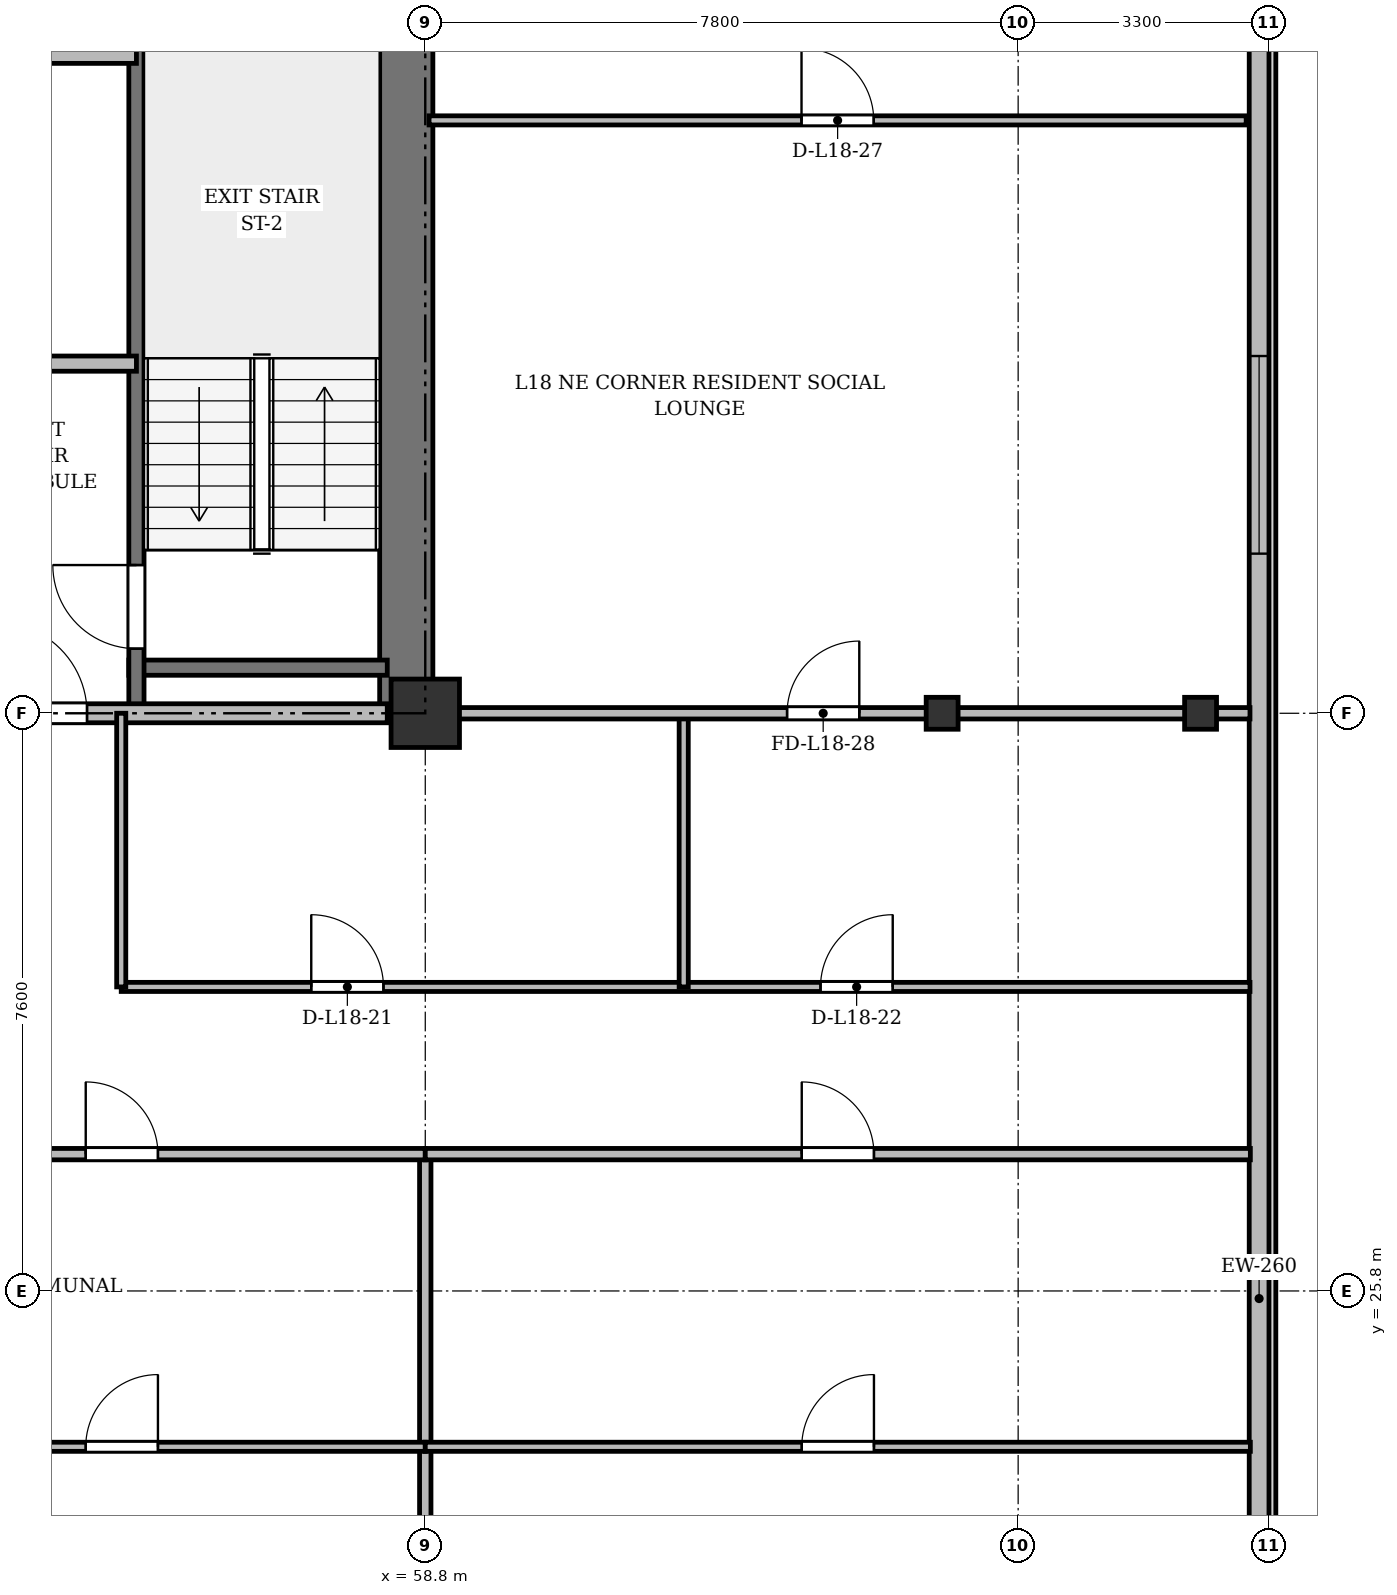
"""IFC4 building model, lengths in metres.
Left out: names, types, materials, properties, quantities, classifications, styles, units other than length and angle.
Written with IfcOpenShell. Run it as: python <this file> out.ifc"""

import sys

from ifc_helpers import new_model, si_unit, direction, frame, frame_2d, origin, origin_2d, place, context, subcontext, project, spatial, rectangle, i_section, extrude, source, transform, mapped, element, fill, save


model = new_model("IFC4")
c1 = context("Model", 3, precision=1e-05, world=origin(), true_north=direction((0.0, 1.0)))
c2 = subcontext(c1, "Body", "Model", "MODEL_VIEW")
j1 = project(units=[si_unit("LENGTHUNIT", "METRE"), si_unit("PLANEANGLEUNIT", "RADIAN")], contexts=[c1])
p1 = place(None, origin())
s1 = spatial("IfcSite", under=j1, at=p1, CompositionType="ELEMENT")
p2 = place(p1, origin())
s2 = spatial("IfcBuilding", under=s1, at=p2, CompositionType="ELEMENT")
p3 = place(p2, frame((0.0, 0.0, 70.3)))
s3 = spatial("IfcBuildingStorey", under=s2, at=p3, CompositionType="ELEMENT", Elevation=70.3)
m1 = source(origin(), c2, "Body", "SweptSolid", [
    extrude(rectangle(XDim=0.9, YDim=0.9, at=origin_2d()), origin(), (0.0, 0.0, 1.0), 3.6),
])
p4 = place(p3, frame((58.8, 33.4, 0.0), z_axis=(0.0, 0.0, 1.0), x_axis=(1.0, 0.0, 0.0)))
e1 = element("IfcColumn", 1, at=p4, inside=s3, PredefinedType="COLUMN", context=c2, shape_type="MappedRepresentation", body=[
    mapped(m1, transform((0.0, 0.0, 0.0), x_axis=(1.0, 0.0, 0.0), y_axis=(0.0, 1.0, 0.0), z_axis=(0.0, 0.0, 1.0), scale=1.0)),
])
m2 = source(origin(), c2, "Body", "SweptSolid", [
    extrude(i_section(OverallWidth=0.42, OverallDepth=0.42, WebThickness=0.026, FlangeThickness=0.04, at=origin_2d()), origin(), (0.0, 0.0, 1.0), 3.6),
])
for number, where, z_axis, x_axis in (
    (2, (65.6, 33.4, 0.0), (0.0, 0.0, 1.0), (1.0, 0.0, 0.0)),
    (3, (69.0, 33.4, 0.0), (0.0, 0.0, 1.0), (1.0, 0.0, 0.0)),
):
    element("IfcColumn", number, at=place(p3, frame(where, z_axis=z_axis, x_axis=x_axis)), inside=s3, PredefinedType="COLUMN", context=c2, shape_type="MappedRepresentation", body=[
        mapped(m2, transform((0.0, 0.0, 0.0), x_axis=(1.0, 0.0, 0.0), y_axis=(0.0, 1.0, 0.0), z_axis=(0.0, 0.0, 1.0), scale=1.0)),
    ])
p5 = place(p3, frame((69.77, 45.5, 0.0), z_axis=(0.0, 0.0, 1.0), x_axis=(0.0, -1.0, 0.0)))
e4 = element("IfcWall", 4, at=p5, inside=s3, PredefinedType="SOLIDWALL", context=c2, shape_type="SweptSolid", body=[
    extrude(rectangle(XDim=39.6, YDim=0.26, at=frame_2d((19.8, 0.0))), origin(), (0.0, 0.0, 1.0), 3.22),
])
p6 = place(p5, frame((36.95, 0.0, 0.92)))
e5 = element("IfcOpeningElement", 5, at=p6, cuts=e4, PredefinedType="OPENING", context=c2, shape_type="SweptSolid", body=[
    extrude(rectangle(XDim=1.2, YDim=1.65, at=frame_2d((0.6, 0.825))), frame((0.0, 0.14, 0.0), z_axis=(0.0, -1.0, 0.0), x_axis=(1.0, 0.0, 0.0)), (0.0, 0.0, 1.0), 0.28),
])
p7 = place(p5, frame((32.8, 0.0, 0.92)))
e6 = element("IfcOpeningElement", 6, at=p7, cuts=e4, PredefinedType="OPENING", context=c2, shape_type="SweptSolid", body=[
    extrude(rectangle(XDim=2.6, YDim=1.9, at=frame_2d((1.3, 0.95))), frame((0.0, 0.14, 0.0), z_axis=(0.0, -1.0, 0.0), x_axis=(1.0, 0.0, 0.0)), (0.0, 0.0, 1.0), 0.28),
])
p8 = place(p5, frame((28.6, 0.0, 0.92)))
e7 = element("IfcOpeningElement", 7, at=p8, cuts=e4, PredefinedType="OPENING", context=c2, shape_type="SweptSolid", body=[
    extrude(rectangle(XDim=2.6, YDim=1.9, at=frame_2d((1.3, 0.95))), frame((0.0, 0.14, 0.0), z_axis=(0.0, -1.0, 0.0), x_axis=(1.0, 0.0, 0.0)), (0.0, 0.0, 1.0), 0.28),
])
p9 = place(p5, frame((7.4, 0.0, 0.92)))
e8 = element("IfcOpeningElement", 8, at=p9, cuts=e4, PredefinedType="OPENING", context=c2, shape_type="SweptSolid", body=[
    extrude(rectangle(XDim=2.6, YDim=1.9, at=frame_2d((1.3, 0.95))), frame((0.0, 0.14, 0.0), z_axis=(0.0, -1.0, 0.0), x_axis=(1.0, 0.0, 0.0)), (0.0, 0.0, 1.0), 0.28),
])
p10 = place(p5, frame((1.15, 0.0, 0.92)))
e9 = element("IfcOpeningElement", 9, at=p10, cuts=e4, PredefinedType="OPENING", context=c2, shape_type="SweptSolid", body=[
    extrude(rectangle(XDim=1.2, YDim=1.65, at=frame_2d((0.6, 0.825))), frame((0.0, 0.14, 0.0), z_axis=(0.0, -1.0, 0.0), x_axis=(1.0, 0.0, 0.0)), (0.0, 0.0, 1.0), 0.28),
])
p11 = place(p3, frame((58.55, 33.4, 0.0), z_axis=(0.0, 0.0, 1.0), x_axis=(0.0, 1.0, 0.0)))
e10 = element("IfcWall", 10, at=p11, inside=s3, PredefinedType="SHEAR", context=c2, shape_type="SweptSolid", body=[
    extrude(rectangle(XDim=11.7, YDim=0.7, at=frame_2d((5.85, 0.0))), origin(), (0.0, 0.0, 1.0), 3.22),
])
p12 = place(p3, frame((54.9, 34.0, 0.0), z_axis=(0.0, 0.0, 1.0), x_axis=(1.0, 0.0, 0.0)))
e11 = element("IfcWall", 11, at=p12, inside=s3, PredefinedType="SHEAR", context=c2, shape_type="SweptSolid", body=[
    extrude(rectangle(XDim=3.4, YDim=0.2, at=frame_2d((1.7, 0.0))), origin(), (0.0, 0.0, 1.0), 3.22),
])
p13 = place(p3, frame((55.0, 33.4, 0.0), z_axis=(0.0, 0.0, 1.0), x_axis=(0.0, 1.0, 0.0)))
e12 = element("IfcWall", 12, at=p13, inside=s3, PredefinedType="SHEAR", context=c2, shape_type="SweptSolid", body=[
    extrude(rectangle(XDim=11.1, YDim=0.2, at=frame_2d((5.55, 0.0))), origin(), (0.0, 0.0, 1.0), 3.22),
])
p14 = place(p13, frame((0.85, 0.0, 0.0)))
e13 = element("IfcOpeningElement", 13, at=p14, cuts=e12, PredefinedType="OPENING", context=c2, shape_type="SweptSolid", body=[
    extrude(rectangle(XDim=1.1, YDim=2.15, at=frame_2d((0.55, 1.075))), frame((0.0, 0.11, 0.0), z_axis=(0.0, -1.0, 0.0), x_axis=(1.0, 0.0, 0.0)), (0.0, 0.0, 1.0), 0.22),
])
p15 = place(p3, frame((47.15, 42.05, 0.0), z_axis=(0.0, 0.0, 1.0), x_axis=(1.0, 0.0, 0.0)))
e14 = element("IfcWall", 14, at=p15, inside=s3, PredefinedType="SOLIDWALL", context=c2, shape_type="SweptSolid", body=[
    extrude(rectangle(XDim=7.85, YDim=0.2, at=frame_2d((3.925, 0.0))), origin(), (0.0, 0.0, 1.0), 2.632),
])
p16 = place(p15, frame((0.75, 0.0, 0.0)))
e15 = element("IfcOpeningElement", 15, at=p16, cuts=e14, PredefinedType="OPENING", context=c2, shape_type="SweptSolid", body=[
    extrude(rectangle(XDim=0.9, YDim=2.1, at=frame_2d((0.45, 1.05))), frame((0.0, 0.11, 0.0), z_axis=(0.0, -1.0, 0.0), x_axis=(1.0, 0.0, 0.0)), (0.0, 0.0, 1.0), 0.22),
])
p17 = place(p15, frame((3.85, 0.0, 0.0)))
e16 = element("IfcOpeningElement", 16, at=p17, cuts=e14, PredefinedType="OPENING", context=c2, shape_type="SweptSolid", body=[
    extrude(rectangle(XDim=0.9, YDim=2.1, at=frame_2d((0.45, 1.05))), frame((0.0, 0.11, 0.0), z_axis=(0.0, -1.0, 0.0), x_axis=(1.0, 0.0, 0.0)), (0.0, 0.0, 1.0), 0.22),
])
p18 = place(p3, frame((52.45, 38.0, 0.0), z_axis=(0.0, 0.0, 1.0), x_axis=(1.0, 0.0, 0.0)))
e17 = element("IfcWall", 17, at=p18, inside=s3, PredefinedType="PARTITIONING", context=c2, shape_type="SweptSolid", body=[
    extrude(rectangle(XDim=2.55, YDim=0.2, at=frame_2d((1.275, 0.0))), origin(), (0.0, 0.0, 1.0), 3.22),
])
p19 = place(p3, frame((47.15, 33.4, 0.0), z_axis=(0.0, 0.0, 1.0), x_axis=(1.0, 0.0, 0.0)))
e18 = element("IfcWall", 18, at=p19, inside=s3, PredefinedType="PARTITIONING", context=c2, shape_type="SweptSolid", body=[
    extrude(rectangle(XDim=11.15, YDim=0.25, at=frame_2d((5.575, 0.0))), origin(), (0.0, 0.0, 1.0), 2.57),
])
p20 = place(p19, frame((0.7, 0.0, 0.0)))
e19 = element("IfcOpeningElement", 19, at=p20, cuts=e18, PredefinedType="OPENING", context=c2, shape_type="SweptSolid", body=[
    extrude(rectangle(XDim=0.95, YDim=2.15, at=frame_2d((0.475, 1.075))), frame((0.0, 0.135, 0.0), z_axis=(0.0, -1.0, 0.0), x_axis=(1.0, 0.0, 0.0)), (0.0, 0.0, 1.0), 0.27),
])
p21 = place(p19, frame((6.0, 0.0, 0.0)))
e20 = element("IfcOpeningElement", 20, at=p21, cuts=e18, PredefinedType="OPENING", context=c2, shape_type="SweptSolid", body=[
    extrude(rectangle(XDim=1.2, YDim=2.15, at=frame_2d((0.6, 1.075))), frame((0.0, 0.135, 0.0), z_axis=(0.0, -1.0, 0.0), x_axis=(1.0, 0.0, 0.0)), (0.0, 0.0, 1.0), 0.27),
])
p22 = place(p3, frame((54.8, 29.8, 0.0), z_axis=(0.0, 0.0, 1.0), x_axis=(1.0, 0.0, 0.0)))
e21 = element("IfcWall", 21, at=p22, inside=s3, PredefinedType="PARTITIONING", context=c2, shape_type="SweptSolid", body=[
    extrude(rectangle(XDim=14.85, YDim=0.12, at=frame_2d((7.425, 0.0))), origin(), (0.0, 0.0, 1.0), 2.632),
])
p23 = place(p22, frame((2.5, 0.0, 0.0)))
e22 = element("IfcOpeningElement", 22, at=p23, cuts=e21, PredefinedType="OPENING", context=c2, shape_type="SweptSolid", body=[
    extrude(rectangle(XDim=0.95, YDim=2.15, at=frame_2d((0.475, 1.075))), frame((0.0, 0.07, 0.0), z_axis=(0.0, -1.0, 0.0), x_axis=(1.0, 0.0, 0.0)), (0.0, 0.0, 1.0), 0.14),
])
p24 = place(p22, frame((9.2, 0.0, 0.0)))
e23 = element("IfcOpeningElement", 23, at=p24, cuts=e21, PredefinedType="OPENING", context=c2, shape_type="SweptSolid", body=[
    extrude(rectangle(XDim=0.95, YDim=2.15, at=frame_2d((0.475, 1.075))), frame((0.0, 0.07, 0.0), z_axis=(0.0, -1.0, 0.0), x_axis=(1.0, 0.0, 0.0)), (0.0, 0.0, 1.0), 0.14),
])
for number, where, z_axis, x_axis in (
    (24, (62.2, 29.8, 0.0), (0.0, 0.0, 1.0), (0.0, 1.0, 0.0)),
    (25, (54.8, 29.8, 0.0), (0.0, 0.0, 1.0), (0.0, 1.0, 0.0)),
):
    element("IfcWall", number, at=place(p3, frame(where, z_axis=z_axis, x_axis=x_axis)), inside=s3, PredefinedType="PARTITIONING", context=c2, shape_type="SweptSolid", body=[
        extrude(rectangle(XDim=3.6, YDim=0.12, at=frame_2d((1.8, 0.0))), origin(), (0.0, 0.0, 1.0), 2.57),
    ])
p25 = place(p3, frame((58.85, 41.2, 0.0), z_axis=(0.0, 0.0, 1.0), x_axis=(1.0, 0.0, 0.0)))
e26 = element("IfcWall", 26, at=p25, inside=s3, PredefinedType="PARTITIONING", context=c2, shape_type="SweptSolid", body=[
    extrude(rectangle(XDim=10.75, YDim=0.12, at=frame_2d((5.375, 0.0))), origin(), (0.0, 0.0, 1.0), 2.632),
])
p26 = place(p25, frame((4.9, 0.0, 0.0)))
e27 = element("IfcOpeningElement", 27, at=p26, cuts=e26, PredefinedType="OPENING", context=c2, shape_type="SweptSolid", body=[
    extrude(rectangle(XDim=0.95, YDim=2.15, at=frame_2d((0.475, 1.075))), frame((0.0, 0.07, 0.0), z_axis=(0.0, -1.0, 0.0), x_axis=(1.0, 0.0, 0.0)), (0.0, 0.0, 1.0), 0.14),
])
p27 = place(p3, frame((58.8, 33.4, 0.0), z_axis=(0.0, 0.0, 1.0), x_axis=(1.0, 0.0, 0.0)))
e28 = element("IfcWall", 28, at=p27, inside=s3, PredefinedType="PARTITIONING", context=c2, shape_type="SweptSolid", body=[
    extrude(rectangle(XDim=10.85, YDim=0.15, at=frame_2d((5.425, 0.0))), origin(), (0.0, 0.0, 1.0), 2.57),
])
p28 = place(p27, frame((4.76, 0.0, 0.0)))
e29 = element("IfcOpeningElement", 29, at=p28, cuts=e28, PredefinedType="OPENING", context=c2, shape_type="SweptSolid", body=[
    extrude(rectangle(XDim=0.95, YDim=2.15, at=frame_2d((0.475, 1.075))), frame((0.0, 0.085, 0.0), z_axis=(0.0, -1.0, 0.0), x_axis=(1.0, 0.0, 0.0)), (0.0, 0.0, 1.0), 0.17),
])
p29 = place(p3, frame((58.8, 3.145, 0.0), z_axis=(0.0, 0.0, 1.0), x_axis=(0.0, 1.0, 0.0)))
e30 = element("IfcWall", 30, at=p29, inside=s3, PredefinedType="PARTITIONING", context=c2, shape_type="SweptSolid", body=[
    extrude(rectangle(XDim=24.455, YDim=0.15, at=frame_2d((12.228, 0.0))), origin(), (0.0, 0.0, 1.0), 2.632),
])
p30 = place(p3, frame((51.0, 27.6, 0.0), z_axis=(0.0, 0.0, 1.0), x_axis=(1.0, 0.0, 0.0)))
e31 = element("IfcWall", 31, at=p30, inside=s3, PredefinedType="PARTITIONING", context=c2, shape_type="SweptSolid", body=[
    extrude(rectangle(XDim=7.8, YDim=0.15, at=frame_2d((3.9, 0.0))), origin(), (0.0, 0.0, 1.0), 2.632),
])
p31 = place(p30, frame((3.333, 0.0, 0.0)))
e32 = element("IfcOpeningElement", 32, at=p31, cuts=e31, PredefinedType="OPENING", context=c2, shape_type="SweptSolid", body=[
    extrude(rectangle(XDim=0.95, YDim=2.15, at=frame_2d((0.475, 1.075))), frame((0.0, 0.085, 0.0), z_axis=(0.0, -1.0, 0.0), x_axis=(1.0, 0.0, 0.0)), (0.0, 0.0, 1.0), 0.17),
])
p32 = place(p3, frame((51.0, 23.75, 0.0), z_axis=(0.0, 0.0, 1.0), x_axis=(1.0, 0.0, 0.0)))
e33 = element("IfcWall", 33, at=p32, inside=s3, PredefinedType="PARTITIONING", context=c2, shape_type="SweptSolid", body=[
    extrude(rectangle(XDim=7.8, YDim=0.12, at=frame_2d((3.9, 0.0))), origin(), (0.0, 0.0, 1.0), 2.632),
])
p33 = place(p32, frame((3.333, 0.0, 0.0)))
e34 = element("IfcOpeningElement", 34, at=p33, cuts=e33, PredefinedType="OPENING", context=c2, shape_type="SweptSolid", body=[
    extrude(rectangle(XDim=0.95, YDim=2.15, at=frame_2d((0.475, 1.075))), frame((0.0, 0.07, 0.0), z_axis=(0.0, -1.0, 0.0), x_axis=(1.0, 0.0, 0.0)), (0.0, 0.0, 1.0), 0.14),
])
p34 = place(p3, frame((58.8, 27.6, 0.0), z_axis=(0.0, 0.0, 1.0), x_axis=(1.0, 0.0, 0.0)))
e35 = element("IfcWall", 35, at=p34, inside=s3, PredefinedType="PARTITIONING", context=c2, shape_type="SweptSolid", body=[
    extrude(rectangle(XDim=10.855, YDim=0.15, at=frame_2d((5.427, 0.0))), origin(), (0.0, 0.0, 1.0), 2.632),
])
p35 = place(p34, frame((4.953, 0.0, 0.0)))
e36 = element("IfcOpeningElement", 36, at=p35, cuts=e35, PredefinedType="OPENING", context=c2, shape_type="SweptSolid", body=[
    extrude(rectangle(XDim=0.95, YDim=2.15, at=frame_2d((0.475, 1.075))), frame((0.0, 0.085, 0.0), z_axis=(0.0, -1.0, 0.0), x_axis=(1.0, 0.0, 0.0)), (0.0, 0.0, 1.0), 0.17),
])
p36 = place(p3, frame((58.8, 23.75, 0.0), z_axis=(0.0, 0.0, 1.0), x_axis=(1.0, 0.0, 0.0)))
e37 = element("IfcWall", 37, at=p36, inside=s3, PredefinedType="PARTITIONING", context=c2, shape_type="SweptSolid", body=[
    extrude(rectangle(XDim=10.855, YDim=0.12, at=frame_2d((5.427, 0.0))), origin(), (0.0, 0.0, 1.0), 2.632),
])
p37 = place(p36, frame((4.953, 0.0, 0.0)))
e38 = element("IfcOpeningElement", 38, at=p37, cuts=e37, PredefinedType="OPENING", context=c2, shape_type="SweptSolid", body=[
    extrude(rectangle(XDim=0.95, YDim=2.15, at=frame_2d((0.475, 1.075))), frame((0.0, 0.07, 0.0), z_axis=(0.0, -1.0, 0.0), x_axis=(1.0, 0.0, 0.0)), (0.0, 0.0, 1.0), 0.14),
])
m3 = source(origin(), c2, "Body", "SweptSolid", [
    extrude(rectangle(XDim=2.6, YDim=1.9, at=frame_2d((1.3, 0.95))), frame((0.0, 0.03, 0.0), z_axis=(0.0, -1.0, 0.0), x_axis=(1.0, 0.0, 0.0)), (0.0, 0.0, 1.0), 0.06),
])
p38 = place(p9, origin())
e39 = element("IfcWindow", 39, at=p38, inside=s3, PartitioningType="SINGLE_PANEL", PredefinedType="WINDOW", context=c2, shape_type="MappedRepresentation", body=[
    mapped(m3, transform((0.0, 0.0, 0.0), x_axis=(1.0, 0.0, 0.0), y_axis=(0.0, 1.0, 0.0), z_axis=(0.0, 0.0, 1.0), scale=1.0)),
])
fill(e8, e39)
m4 = source(origin(), c2, "Body", "SweptSolid", [
    extrude(rectangle(XDim=1.1, YDim=2.15, at=frame_2d((0.55, 1.075))), frame((0.0, 0.025, 0.0), z_axis=(0.0, -1.0, 0.0), x_axis=(1.0, 0.0, 0.0)), (0.0, 0.0, 1.0), 0.05),
])
p39 = place(p14, origin())
e40 = element("IfcDoor", 40, at=p39, inside=s3, OperationType="SINGLE_SWING_RIGHT", PredefinedType="DOOR", context=c2, shape_type="MappedRepresentation", body=[
    mapped(m4, transform((0.0, 0.0, 0.0), x_axis=(1.0, 0.0, 0.0), y_axis=(0.0, 1.0, 0.0), z_axis=(0.0, 0.0, 1.0), scale=1.0)),
])
fill(e13, e40)
m5 = source(origin(), c2, "Body", "SweptSolid", [
    extrude(rectangle(XDim=1.2, YDim=2.15, at=frame_2d((0.6, 1.075))), frame((0.0, 0.025, 0.0), z_axis=(0.0, -1.0, 0.0), x_axis=(1.0, 0.0, 0.0)), (0.0, 0.0, 1.0), 0.05),
])
p40 = place(p21, origin())
e41 = element("IfcDoor", 41, at=p40, inside=s3, OperationType="SINGLE_SWING_LEFT", PredefinedType="DOOR", context=c2, shape_type="MappedRepresentation", body=[
    mapped(m5, transform((0.0, 0.0, 0.0), x_axis=(1.0, 0.0, 0.0), y_axis=(0.0, 1.0, 0.0), z_axis=(0.0, 0.0, 1.0), scale=1.0)),
])
fill(e20, e41)
m6 = source(origin(), c2, "Body", "SweptSolid", [
    extrude(rectangle(XDim=0.95, YDim=2.15, at=frame_2d((0.475, 1.075))), frame((0.0, 0.025, 0.0), z_axis=(0.0, -1.0, 0.0), x_axis=(1.0, 0.0, 0.0)), (0.0, 0.0, 1.0), 0.05),
])
p41 = place(p23, origin())
e42 = element("IfcDoor", 42, at=p41, inside=s3, OperationType="SINGLE_SWING_LEFT", PredefinedType="DOOR", context=c2, shape_type="MappedRepresentation", body=[
    mapped(m6, transform((0.0, 0.0, 0.0), x_axis=(1.0, 0.0, 0.0), y_axis=(0.0, 1.0, 0.0), z_axis=(0.0, 0.0, 1.0), scale=1.0)),
])
fill(e22, e42)
p42 = place(p24, origin())
e43 = element("IfcDoor", 43, at=p42, inside=s3, OperationType="SINGLE_SWING_RIGHT", PredefinedType="DOOR", context=c2, shape_type="MappedRepresentation", body=[
    mapped(m6, transform((0.0, 0.0, 0.0), x_axis=(1.0, 0.0, 0.0), y_axis=(0.0, 1.0, 0.0), z_axis=(0.0, 0.0, 1.0), scale=1.0)),
])
fill(e23, e43)
p43 = place(p26, origin())
e44 = element("IfcDoor", 44, at=p43, inside=s3, OperationType="SINGLE_SWING_LEFT", PredefinedType="DOOR", context=c2, shape_type="MappedRepresentation", body=[
    mapped(m6, transform((0.0, 0.0, 0.0), x_axis=(1.0, 0.0, 0.0), y_axis=(0.0, 1.0, 0.0), z_axis=(0.0, 0.0, 1.0), scale=1.0)),
])
fill(e27, e44)
p44 = place(p28, origin())
e45 = element("IfcDoor", 45, at=p44, inside=s3, OperationType="SINGLE_SWING_RIGHT", PredefinedType="DOOR", context=c2, shape_type="MappedRepresentation", body=[
    mapped(m6, transform((0.0, 0.0, 0.0), x_axis=(1.0, 0.0, 0.0), y_axis=(0.0, 1.0, 0.0), z_axis=(0.0, 0.0, 1.0), scale=1.0)),
])
fill(e29, e45)
p45 = place(p31, origin())
e46 = element("IfcDoor", 46, at=p45, inside=s3, OperationType="SINGLE_SWING_LEFT", PredefinedType="DOOR", context=c2, shape_type="MappedRepresentation", body=[
    mapped(m6, transform((0.0, 0.0, 0.0), x_axis=(1.0, 0.0, 0.0), y_axis=(0.0, 1.0, 0.0), z_axis=(0.0, 0.0, 1.0), scale=1.0)),
])
fill(e32, e46)
p46 = place(p33, origin())
e47 = element("IfcDoor", 47, at=p46, inside=s3, OperationType="SINGLE_SWING_RIGHT", PredefinedType="DOOR", context=c2, shape_type="MappedRepresentation", body=[
    mapped(m6, transform((0.0, 0.0, 0.0), x_axis=(1.0, 0.0, 0.0), y_axis=(0.0, 1.0, 0.0), z_axis=(0.0, 0.0, 1.0), scale=1.0)),
])
fill(e34, e47)
p47 = place(p35, origin())
e48 = element("IfcDoor", 48, at=p47, inside=s3, OperationType="SINGLE_SWING_LEFT", PredefinedType="DOOR", context=c2, shape_type="MappedRepresentation", body=[
    mapped(m6, transform((0.0, 0.0, 0.0), x_axis=(1.0, 0.0, 0.0), y_axis=(0.0, 1.0, 0.0), z_axis=(0.0, 0.0, 1.0), scale=1.0)),
])
fill(e36, e48)
p48 = place(p37, origin())
e49 = element("IfcDoor", 49, at=p48, inside=s3, OperationType="SINGLE_SWING_RIGHT", PredefinedType="DOOR", context=c2, shape_type="MappedRepresentation", body=[
    mapped(m6, transform((0.0, 0.0, 0.0), x_axis=(1.0, 0.0, 0.0), y_axis=(0.0, 1.0, 0.0), z_axis=(0.0, 0.0, 1.0), scale=1.0)),
])
fill(e38, e49)
save(model, sys.argv[1])
